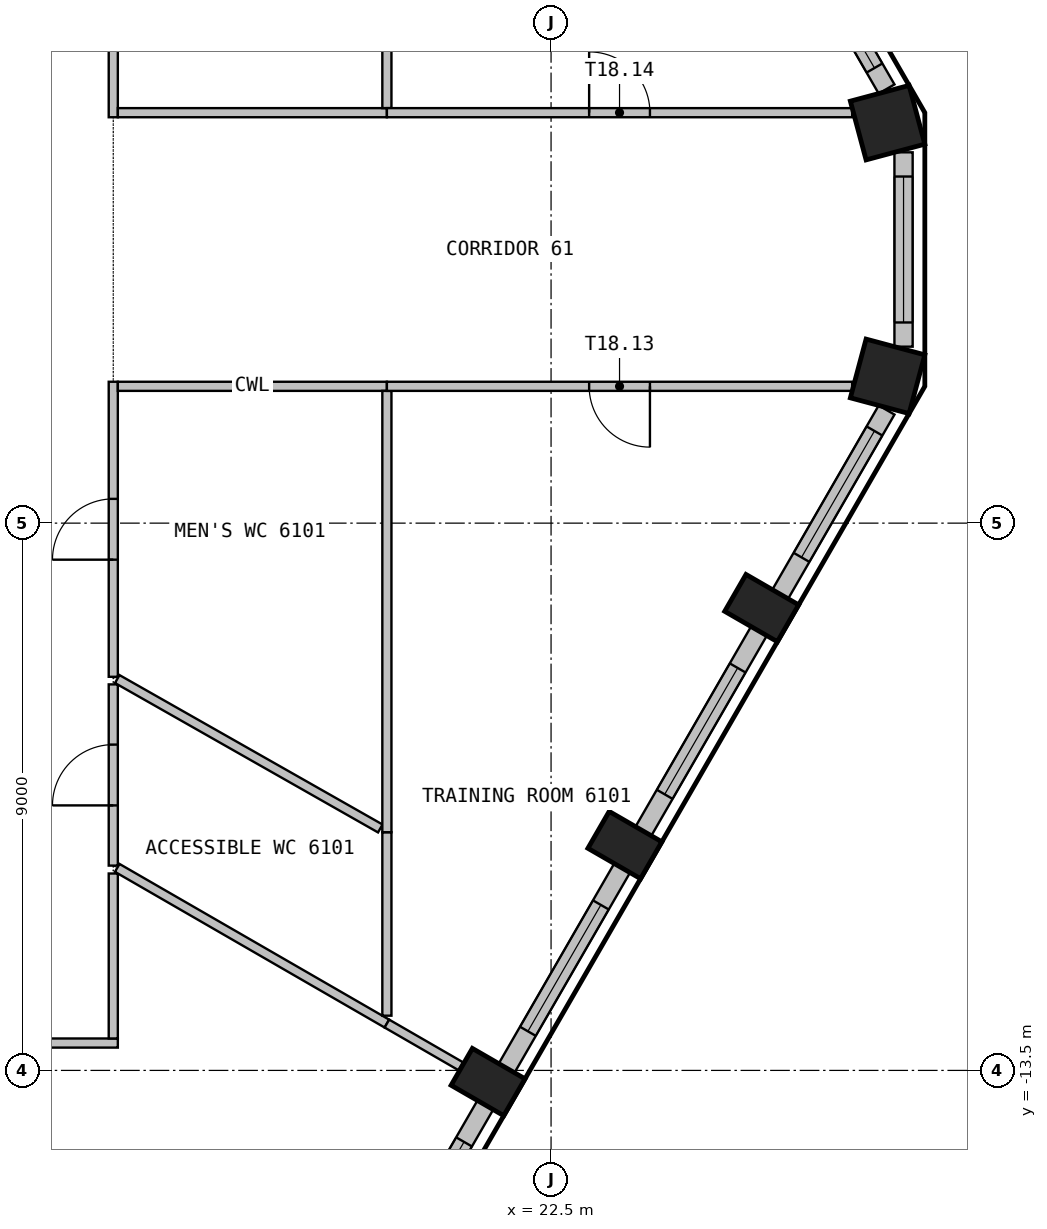
"""IFC4 building model, lengths in metres.
Left out: names, types, materials, properties, quantities, classifications, styles, units other than length and angle.
Written with IfcOpenShell. Run it as: python <this file> out.ifc"""

import sys

from ifc_helpers import new_model, si_unit, direction, frame, frame_2d, origin, origin_2d, place, context, subcontext, project, spatial, rectangle, extrude, element, fill, save


model = new_model("IFC4")
c1 = context("Model", 3, precision=1e-05, world=origin(), true_north=direction((0.0, 1.0)))
c2 = subcontext(c1, "Body", "Model", "MODEL_VIEW")
j1 = project(units=[si_unit("LENGTHUNIT", "METRE"), si_unit("PLANEANGLEUNIT", "RADIAN")], contexts=[c1])
p1 = place(None, origin())
s1 = spatial("IfcSite", under=j1, at=p1, CompositionType="ELEMENT")
p2 = place(p1, origin())
s2 = spatial("IfcBuilding", under=s1, at=p2, CompositionType="ELEMENT")
p3 = place(p2, frame((0.0, 0.0, 246.9)))
s3 = spatial("IfcBuildingStorey", under=s2, at=p3, CompositionType="ELEMENT", Elevation=246.9)
for number, where, z_axis, x_axis in (
    (1, (21.464, -13.691, 0.0), (0.0, 0.0, 1.0), (0.5, 0.866, 0.0)),
    (2, (23.714, -9.794, 0.0), (0.0, 0.0, 1.0), (0.5, 0.866, 0.0)),
    (3, (25.964, -5.897, 0.0), (0.0, 0.0, 1.0), (0.5, 0.866, 0.0)),
):
    element("IfcColumn", number, at=place(p3, frame(where, z_axis=z_axis, x_axis=x_axis)), inside=s3, PredefinedType="COLUMN", context=c2, shape_type="SweptSolid", body=[
        extrude(rectangle(XDim=0.7, YDim=1.0, at=origin_2d()), origin(), (0.0, 0.0, 1.0), 3.575),
    ])
for number, where, z_axis, x_axis in (
    (4, (28.035, -2.086, 0.0), (0.0, 0.0, 1.0), (0.259, 0.966, 0.0)),
    (5, (28.035, 2.086, 0.0), (0.0, 0.0, 1.0), (-0.259, 0.966, 0.0)),
):
    element("IfcColumn", number, at=place(p3, frame(where, z_axis=z_axis, x_axis=x_axis)), inside=s3, PredefinedType="COLUMN", context=c2, shape_type="SweptSolid", body=[
        extrude(rectangle(XDim=1.0, YDim=1.0, at=origin_2d()), origin(), (0.0, 0.0, 1.0), 3.575),
    ])
p4 = place(p3, frame((19.67, -17.099, 0.0), z_axis=(0.0, 0.0, 1.0), x_axis=(0.499960102815, 0.866048437209, 0.0)))
e6 = element("IfcWall", 6, at=p4, inside=s3, PredefinedType="SOLIDWALL", context=c2, shape_type="SweptSolid", body=[
    extrude(rectangle(XDim=3.498, YDim=0.3, at=frame_2d((1.749, 0.0))), origin(), (0.0, 0.0, 1.0), 3.575),
])
p5 = place(p4, frame((0.398, 0.0, 0.9)))
e7 = element("IfcOpeningElement", 7, at=p5, cuts=e6, PredefinedType="OPENING", context=c2, shape_type="SweptSolid", body=[
    extrude(rectangle(XDim=2.4, YDim=2.1, at=frame_2d((1.2, 1.05))), frame((0.0, 0.16, 0.0), z_axis=(0.0, -1.0, 0.0), x_axis=(1.0, 0.0, 0.0)), (0.0, 0.0, 1.0), 0.32),
])
p6 = place(p3, frame((21.769, -13.463, 0.0), z_axis=(0.0, 0.0, 1.0), x_axis=(0.499982058975, 0.866035761792, 0.0)))
e8 = element("IfcWall", 8, at=p6, inside=s3, PredefinedType="SOLIDWALL", context=c2, shape_type="SweptSolid", body=[
    extrude(rectangle(XDim=3.799, YDim=0.3, at=frame_2d((1.899, 0.0))), origin(), (0.0, 0.0, 1.0), 3.575),
])
p7 = place(p6, frame((0.699, 0.0, 0.9)))
e9 = element("IfcOpeningElement", 9, at=p7, cuts=e8, PredefinedType="OPENING", context=c2, shape_type="SweptSolid", body=[
    extrude(rectangle(XDim=2.4, YDim=2.1, at=frame_2d((1.2, 1.05))), frame((0.0, 0.16, 0.0), z_axis=(0.0, -1.0, 0.0), x_axis=(1.0, 0.0, 0.0)), (0.0, 0.0, 1.0), 0.32),
])
p8 = place(p3, frame((24.019, -9.566, 0.0), z_axis=(0.0, 0.0, 1.0), x_axis=(0.499982058975, 0.866035761792, 0.0)))
e10 = element("IfcWall", 10, at=p8, inside=s3, PredefinedType="SOLIDWALL", context=c2, shape_type="SweptSolid", body=[
    extrude(rectangle(XDim=3.799, YDim=0.3, at=frame_2d((1.899, 0.0))), origin(), (0.0, 0.0, 1.0), 3.575),
])
p9 = place(p8, frame((0.699, 0.0, 0.9)))
e11 = element("IfcOpeningElement", 11, at=p9, cuts=e10, PredefinedType="OPENING", context=c2, shape_type="SweptSolid", body=[
    extrude(rectangle(XDim=2.4, YDim=2.1, at=frame_2d((1.2, 1.05))), frame((0.0, 0.16, 0.0), z_axis=(0.0, -1.0, 0.0), x_axis=(1.0, 0.0, 0.0)), (0.0, 0.0, 1.0), 0.32),
])
p10 = place(p3, frame((26.269, -5.669, 0.0), z_axis=(0.0, 0.0, 1.0), x_axis=(0.499990325971, 0.866030989016, 0.0)))
e12 = element("IfcWall", 12, at=p10, inside=s3, PredefinedType="SOLIDWALL", context=c2, shape_type="SweptSolid", body=[
    extrude(rectangle(XDim=3.498, YDim=0.3, at=frame_2d((1.749, 0.0))), origin(), (0.0, 0.0, 1.0), 3.575),
])
p11 = place(p10, frame((0.699, 0.0, 0.9)))
e13 = element("IfcOpeningElement", 13, at=p11, cuts=e12, PredefinedType="OPENING", context=c2, shape_type="SweptSolid", body=[
    extrude(rectangle(XDim=2.4, YDim=2.1, at=frame_2d((1.2, 1.05))), frame((0.0, 0.16, 0.0), z_axis=(0.0, -1.0, 0.0), x_axis=(1.0, 0.0, 0.0)), (0.0, 0.0, 1.0), 0.32),
])
p12 = place(p3, frame((28.297, -1.598, 0.0), z_axis=(0.0, 0.0, 1.0), x_axis=(0.0, 1.0, 0.0)))
e14 = element("IfcWall", 14, at=p12, inside=s3, PredefinedType="SOLIDWALL", context=c2, shape_type="SweptSolid", body=[
    extrude(rectangle(XDim=3.196, YDim=0.3, at=frame_2d((1.598, 0.0))), origin(), (0.0, 0.0, 1.0), 3.575),
])
p13 = place(p12, frame((0.398, 0.0, 0.9)))
e15 = element("IfcOpeningElement", 15, at=p13, cuts=e14, PredefinedType="OPENING", context=c2, shape_type="SweptSolid", body=[
    extrude(rectangle(XDim=2.4, YDim=2.1, at=frame_2d((1.2, 1.05))), frame((0.0, 0.16, 0.0), z_axis=(0.0, -1.0, 0.0), x_axis=(1.0, 0.0, 0.0)), (0.0, 0.0, 1.0), 0.32),
])
p14 = place(p3, frame((28.018, 2.64, 0.0), z_axis=(0.0, 0.0, 1.0), x_axis=(-0.499990325971, 0.866030989016, 0.0)))
e16 = element("IfcWall", 16, at=p14, inside=s3, PredefinedType="SOLIDWALL", context=c2, shape_type="SweptSolid", body=[
    extrude(rectangle(XDim=3.498, YDim=0.3, at=frame_2d((1.749, 0.0))), origin(), (0.0, 0.0, 1.0), 3.575),
])
p15 = place(p14, frame((0.398, 0.0, 0.9)))
e17 = element("IfcOpeningElement", 17, at=p15, cuts=e16, PredefinedType="OPENING", context=c2, shape_type="SweptSolid", body=[
    extrude(rectangle(XDim=2.4, YDim=2.1, at=frame_2d((1.2, 1.05))), frame((0.0, 0.16, 0.0), z_axis=(0.0, -1.0, 0.0), x_axis=(1.0, 0.0, 0.0)), (0.0, 0.0, 1.0), 0.32),
])
p16 = place(p3, frame((11.25, -13.05, 0.0), z_axis=(0.0, 0.0, 1.0), x_axis=(1.0, 0.0, 0.0)))
e18 = element("IfcWall", 18, at=p16, inside=s3, PredefinedType="PARTITIONING", context=c2, shape_type="SweptSolid", body=[
    extrude(rectangle(XDim=4.125, YDim=0.15, at=frame_2d((2.062, 0.0))), origin(), (0.0, 0.0, 1.0), 3.575),
])
p17 = place(p16, frame((1.562, 0.0, 0.0)))
e19 = element("IfcOpeningElement", 19, at=p17, cuts=e18, PredefinedType="OPENING", context=c2, shape_type="SweptSolid", body=[
    extrude(rectangle(XDim=1.0, YDim=2.1, at=frame_2d((0.5, 1.05))), frame((0.0, 0.085, 0.0), z_axis=(0.0, -1.0, 0.0), x_axis=(1.0, 0.0, 0.0)), (0.0, 0.0, 1.0), 0.17),
])
p18 = place(p3, frame((15.3, -12.975, 0.0), z_axis=(0.0, 0.0, 1.0), x_axis=(0.0, 1.0, 0.0)))
e20 = element("IfcWall", 20, at=p18, inside=s3, PredefinedType="PARTITIONING", context=c2, shape_type="SweptSolid", body=[
    extrude(rectangle(XDim=2.713, YDim=0.15, at=frame_2d((1.356, 0.0))), origin(), (0.0, 0.0, 1.0), 3.575),
])
p19 = place(p3, frame((15.3, -10.132, 0.0), z_axis=(0.0, 0.0, 1.0), x_axis=(0.0, 1.0, 0.0)))
e21 = element("IfcWall", 21, at=p19, inside=s3, PredefinedType="PARTITIONING", context=c2, shape_type="SweptSolid", body=[
    extrude(rectangle(XDim=2.98, YDim=0.15, at=frame_2d((1.49, 0.0))), origin(), (0.0, 0.0, 1.0), 3.575),
])
p20 = place(p19, frame((0.99, 0.0, 0.0)))
e22 = element("IfcOpeningElement", 22, at=p20, cuts=e21, PredefinedType="OPENING", context=c2, shape_type="SweptSolid", body=[
    extrude(rectangle(XDim=1.0, YDim=2.1, at=frame_2d((0.5, 1.05))), frame((0.0, 0.085, 0.0), z_axis=(0.0, -1.0, 0.0), x_axis=(1.0, 0.0, 0.0)), (0.0, 0.0, 1.0), 0.17),
])
p21 = place(p3, frame((15.365, -10.169, 0.0), z_axis=(0.0, 0.0, 1.0), x_axis=(0.866028396804, -0.499994815902, 0.0)))
e23 = element("IfcWall", 23, at=p21, inside=s3, PredefinedType="PARTITIONING", context=c2, shape_type="SweptSolid", body=[
    extrude(rectangle(XDim=5.121, YDim=0.15, at=frame_2d((2.561, 0.0))), origin(), (0.0, 0.0, 1.0), 3.575),
])
p22 = place(p3, frame((15.3, -7.027, 0.0), z_axis=(0.0, 0.0, 1.0), x_axis=(0.0, 1.0, 0.0)))
e24 = element("IfcWall", 24, at=p22, inside=s3, PredefinedType="PARTITIONING", context=c2, shape_type="SweptSolid", body=[
    extrude(rectangle(XDim=4.852, YDim=0.15, at=frame_2d((2.426, 0.0))), origin(), (0.0, 0.0, 1.0), 3.575),
])
p23 = place(p22, frame((1.926, 0.0, 0.0)))
e25 = element("IfcOpeningElement", 25, at=p23, cuts=e24, PredefinedType="OPENING", context=c2, shape_type="SweptSolid", body=[
    extrude(rectangle(XDim=1.0, YDim=2.1, at=frame_2d((0.5, 1.05))), frame((0.0, 0.085, 0.0), z_axis=(0.0, -1.0, 0.0), x_axis=(1.0, 0.0, 0.0)), (0.0, 0.0, 1.0), 0.17),
])
p24 = place(p3, frame((15.365, -7.064, 0.0), z_axis=(0.0, 0.0, 1.0), x_axis=(0.869523611324, -0.493891374039, 0.0)))
e26 = element("IfcWall", 26, at=p24, inside=s3, PredefinedType="PARTITIONING", context=c2, shape_type="SweptSolid", body=[
    extrude(rectangle(XDim=4.975, YDim=0.15, at=frame_2d((2.488, 0.0))), origin(), (0.0, 0.0, 1.0), 3.575),
])
p25 = place(p3, frame((19.8, -2.25, 0.0), z_axis=(0.0, 0.0, 1.0), x_axis=(-1.0, 0.0, 0.0)))
e27 = element("IfcWall", 27, at=p25, inside=s3, PredefinedType="PARTITIONING", context=c2, shape_type="SweptSolid", body=[
    extrude(rectangle(XDim=4.425, YDim=0.15, at=frame_2d((2.212, 0.0))), origin(), (0.0, 0.0, 1.0), 3.575),
])
p26 = place(p3, frame((15.3, 2.175, 0.0), z_axis=(0.0, 0.0, 1.0), x_axis=(0.0, 1.0, 0.0)))
e28 = element("IfcWall", 28, at=p26, inside=s3, PredefinedType="PARTITIONING", context=c2, shape_type="SweptSolid", body=[
    extrude(rectangle(XDim=7.957, YDim=0.15, at=frame_2d((3.979, 0.0))), origin(), (0.0, 0.0, 1.0), 3.575),
])
p27 = place(p26, frame((3.479, 0.0, 0.0)))
e29 = element("IfcOpeningElement", 29, at=p27, cuts=e28, PredefinedType="OPENING", context=c2, shape_type="SweptSolid", body=[
    extrude(rectangle(XDim=1.0, YDim=2.1, at=frame_2d((0.5, 1.05))), frame((0.0, 0.085, 0.0), z_axis=(0.0, -1.0, 0.0), x_axis=(1.0, 0.0, 0.0)), (0.0, 0.0, 1.0), 0.17),
])
p28 = place(p3, frame((15.375, 2.25, 0.0), z_axis=(0.0, 0.0, 1.0), x_axis=(1.0, 0.0, 0.0)))
e30 = element("IfcWall", 30, at=p28, inside=s3, PredefinedType="PARTITIONING", context=c2, shape_type="SweptSolid", body=[
    extrude(rectangle(XDim=4.425, YDim=0.15, at=frame_2d((2.212, 0.0))), origin(), (0.0, 0.0, 1.0), 3.575),
])
p29 = place(p3, frame((19.8, -9.583, 0.0), z_axis=(0.0, 0.0, 1.0), x_axis=(0.0, -1.0, 0.0)))
e31 = element("IfcWall", 31, at=p29, inside=s3, PredefinedType="PARTITIONING", context=c2, shape_type="SweptSolid", body=[
    extrude(rectangle(XDim=3.017, YDim=0.15, at=frame_2d((1.509, 0.0))), origin(), (0.0, 0.0, 1.0), 3.575),
])
p30 = place(p3, frame((19.8, -12.73, 0.0), z_axis=(0.0, 0.0, 1.0), x_axis=(0.865918715181, -0.500184744569, 0.0)))
e32 = element("IfcWall", 32, at=p30, inside=s3, PredefinedType="PARTITIONING", context=c2, shape_type="SweptSolid", body=[
    extrude(rectangle(XDim=1.402, YDim=0.15, at=frame_2d((0.701, 0.0))), origin(), (0.0, 0.0, 1.0), 3.575),
])
p31 = place(p3, frame((19.8, -2.325, 0.0), z_axis=(0.0, 0.0, 1.0), x_axis=(0.0, -1.0, 0.0)))
e33 = element("IfcWall", 33, at=p31, inside=s3, PredefinedType="PARTITIONING", context=c2, shape_type="SweptSolid", body=[
    extrude(rectangle(XDim=7.258, YDim=0.15, at=frame_2d((3.629, 0.0))), origin(), (0.0, 0.0, 1.0), 3.575),
])
p32 = place(p3, frame((27.452, -2.25, 0.0), z_axis=(0.0, 0.0, 1.0), x_axis=(-1.0, 0.0, 0.0)))
e34 = element("IfcWall", 34, at=p32, inside=s3, PredefinedType="PARTITIONING", context=c2, shape_type="SweptSolid", body=[
    extrude(rectangle(XDim=7.652, YDim=0.15, at=frame_2d((3.826, 0.0))), origin(), (0.0, 0.0, 1.0), 3.575),
])
p33 = place(p32, frame((3.326, 0.0, 0.0)))
e35 = element("IfcOpeningElement", 35, at=p33, cuts=e34, PredefinedType="OPENING", context=c2, shape_type="SweptSolid", body=[
    extrude(rectangle(XDim=1.0, YDim=2.1, at=frame_2d((0.5, 1.05))), frame((0.0, 0.085, 0.0), z_axis=(0.0, -1.0, 0.0), x_axis=(1.0, 0.0, 0.0)), (0.0, 0.0, 1.0), 0.17),
])
p34 = place(p3, frame((19.8, 12.655, 0.0), z_axis=(0.0, 0.0, 1.0), x_axis=(0.0, -1.0, 0.0)))
e36 = element("IfcWall", 36, at=p34, inside=s3, PredefinedType="PARTITIONING", context=c2, shape_type="SweptSolid", body=[
    extrude(rectangle(XDim=10.33, YDim=0.15, at=frame_2d((5.165, 0.0))), origin(), (0.0, 0.0, 1.0), 3.575),
])
p35 = place(p3, frame((19.8, 2.25, 0.0), z_axis=(0.0, 0.0, 1.0), x_axis=(1.0, 0.0, 0.0)))
e37 = element("IfcWall", 37, at=p35, inside=s3, PredefinedType="PARTITIONING", context=c2, shape_type="SweptSolid", body=[
    extrude(rectangle(XDim=7.652, YDim=0.15, at=frame_2d((3.826, 0.0))), origin(), (0.0, 0.0, 1.0), 3.575),
])
p36 = place(p35, frame((3.326, 0.0, 0.0)))
e38 = element("IfcOpeningElement", 38, at=p36, cuts=e37, PredefinedType="OPENING", context=c2, shape_type="SweptSolid", body=[
    extrude(rectangle(XDim=1.0, YDim=2.1, at=frame_2d((0.5, 1.05))), frame((0.0, 0.085, 0.0), z_axis=(0.0, -1.0, 0.0), x_axis=(1.0, 0.0, 0.0)), (0.0, 0.0, 1.0), 0.17),
])
p37 = place(p5, origin())
e39 = element("IfcWindow", 39, at=p37, inside=s3, PartitioningType="SINGLE_PANEL", PredefinedType="WINDOW", context=c2, shape_type="SweptSolid", body=[
    extrude(rectangle(XDim=2.4, YDim=2.1, at=frame_2d((1.2, 1.05))), frame((0.0, 0.03, 0.0), z_axis=(0.0, -1.0, 0.0), x_axis=(1.0, 0.0, 0.0)), (0.0, 0.0, 1.0), 0.06),
])
fill(e7, e39)
p38 = place(p7, origin())
e40 = element("IfcWindow", 40, at=p38, inside=s3, PartitioningType="SINGLE_PANEL", PredefinedType="WINDOW", context=c2, shape_type="SweptSolid", body=[
    extrude(rectangle(XDim=2.4, YDim=2.1, at=frame_2d((1.2, 1.05))), frame((0.0, 0.03, 0.0), z_axis=(0.0, -1.0, 0.0), x_axis=(1.0, 0.0, 0.0)), (0.0, 0.0, 1.0), 0.06),
])
fill(e9, e40)
p39 = place(p9, origin())
e41 = element("IfcWindow", 41, at=p39, inside=s3, PartitioningType="SINGLE_PANEL", PredefinedType="WINDOW", context=c2, shape_type="SweptSolid", body=[
    extrude(rectangle(XDim=2.4, YDim=2.1, at=frame_2d((1.2, 1.05))), frame((0.0, 0.03, 0.0), z_axis=(0.0, -1.0, 0.0), x_axis=(1.0, 0.0, 0.0)), (0.0, 0.0, 1.0), 0.06),
])
fill(e11, e41)
p40 = place(p11, origin())
e42 = element("IfcWindow", 42, at=p40, inside=s3, PartitioningType="SINGLE_PANEL", PredefinedType="WINDOW", context=c2, shape_type="SweptSolid", body=[
    extrude(rectangle(XDim=2.4, YDim=2.1, at=frame_2d((1.2, 1.05))), frame((0.0, 0.03, 0.0), z_axis=(0.0, -1.0, 0.0), x_axis=(1.0, 0.0, 0.0)), (0.0, 0.0, 1.0), 0.06),
])
fill(e13, e42)
p41 = place(p13, origin())
e43 = element("IfcWindow", 43, at=p41, inside=s3, PartitioningType="SINGLE_PANEL", PredefinedType="WINDOW", context=c2, shape_type="SweptSolid", body=[
    extrude(rectangle(XDim=2.4, YDim=2.1, at=frame_2d((1.2, 1.05))), frame((0.0, 0.03, 0.0), z_axis=(0.0, -1.0, 0.0), x_axis=(1.0, 0.0, 0.0)), (0.0, 0.0, 1.0), 0.06),
])
fill(e15, e43)
p42 = place(p15, origin())
e44 = element("IfcWindow", 44, at=p42, inside=s3, PartitioningType="SINGLE_PANEL", PredefinedType="WINDOW", context=c2, shape_type="SweptSolid", body=[
    extrude(rectangle(XDim=2.4, YDim=2.1, at=frame_2d((1.2, 1.05))), frame((0.0, 0.03, 0.0), z_axis=(0.0, -1.0, 0.0), x_axis=(1.0, 0.0, 0.0)), (0.0, 0.0, 1.0), 0.06),
])
fill(e17, e44)
p43 = place(p20, origin())
e45 = element("IfcDoor", 45, at=p43, inside=s3, OperationType="SINGLE_SWING_RIGHT", PredefinedType="DOOR", context=c2, shape_type="SweptSolid", body=[
    extrude(rectangle(XDim=1.0, YDim=2.1, at=frame_2d((0.5, 1.05))), frame((0.0, 0.025, 0.0), z_axis=(0.0, -1.0, 0.0), x_axis=(1.0, 0.0, 0.0)), (0.0, 0.0, 1.0), 0.05),
])
fill(e22, e45)
p44 = place(p23, origin())
e46 = element("IfcDoor", 46, at=p44, inside=s3, OperationType="SINGLE_SWING_RIGHT", PredefinedType="DOOR", context=c2, shape_type="SweptSolid", body=[
    extrude(rectangle(XDim=1.0, YDim=2.1, at=frame_2d((0.5, 1.05))), frame((0.0, 0.025, 0.0), z_axis=(0.0, -1.0, 0.0), x_axis=(1.0, 0.0, 0.0)), (0.0, 0.0, 1.0), 0.05),
])
fill(e25, e46)
p45 = place(p33, origin())
e47 = element("IfcDoor", 47, at=p45, inside=s3, OperationType="SINGLE_SWING_LEFT", PredefinedType="DOOR", context=c2, shape_type="SweptSolid", body=[
    extrude(rectangle(XDim=1.0, YDim=2.1, at=frame_2d((0.5, 1.05))), frame((0.0, 0.025, 0.0), z_axis=(0.0, -1.0, 0.0), x_axis=(1.0, 0.0, 0.0)), (0.0, 0.0, 1.0), 0.05),
])
fill(e35, e47)
p46 = place(p36, origin())
e48 = element("IfcDoor", 48, at=p46, inside=s3, OperationType="SINGLE_SWING_RIGHT", PredefinedType="DOOR", context=c2, shape_type="SweptSolid", body=[
    extrude(rectangle(XDim=1.0, YDim=2.1, at=frame_2d((0.5, 1.05))), frame((0.0, 0.025, 0.0), z_axis=(0.0, -1.0, 0.0), x_axis=(1.0, 0.0, 0.0)), (0.0, 0.0, 1.0), 0.05),
])
fill(e38, e48)
save(model, sys.argv[1])
